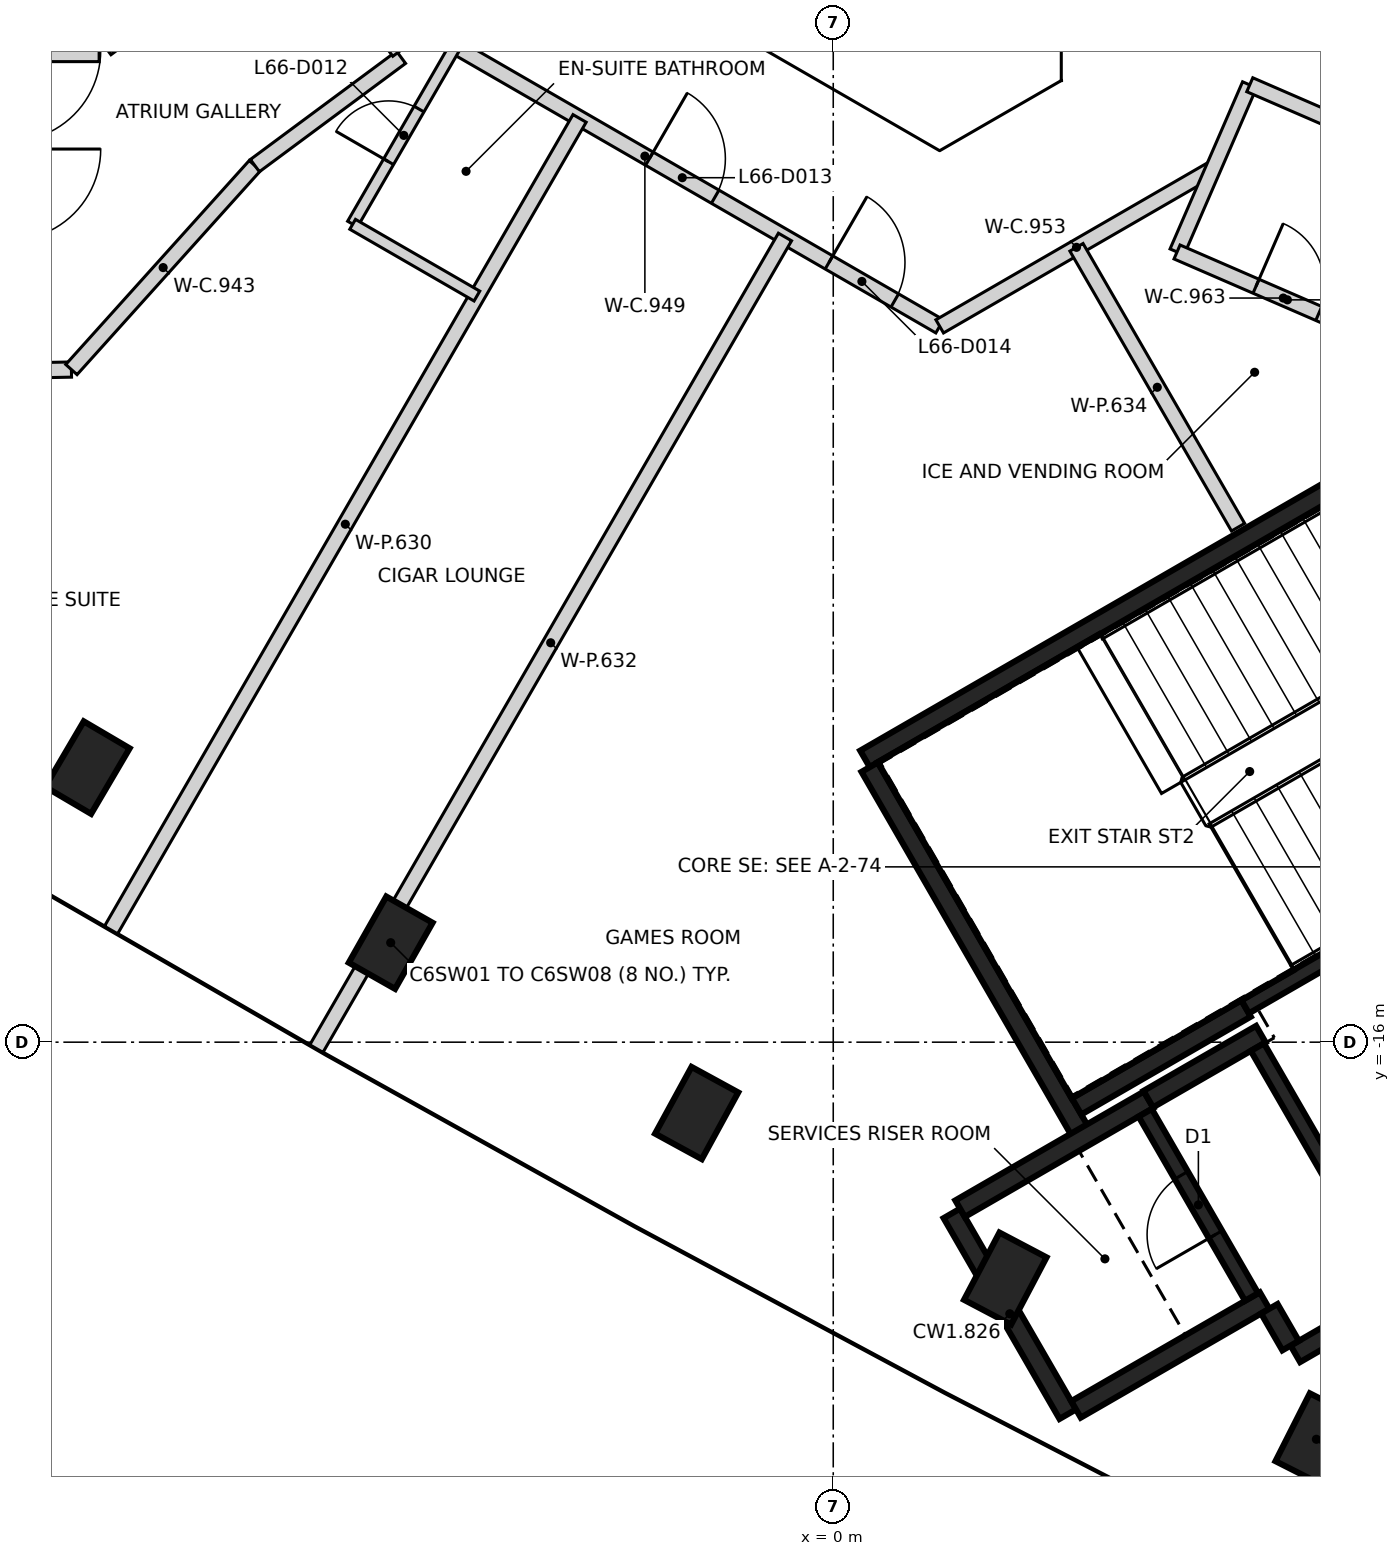
"""IFC4 building model, lengths in metres.
Left out: names, types, materials, properties, quantities, classifications, styles, units other than length and angle.
Written with IfcOpenShell. Run it as: python <this file> out.ifc"""

import sys

from ifc_helpers import new_model, si_unit, direction, frame, frame_2d, origin, origin_2d, place, context, subcontext, project, spatial, rectangle, extrude, element, fill, save


model = new_model("IFC4")
c1 = context("Model", 3, precision=1e-05, world=origin(), true_north=direction((0.0, 1.0)))
c2 = subcontext(c1, "Body", "Model", "MODEL_VIEW")
j1 = project(units=[si_unit("LENGTHUNIT", "METRE"), si_unit("PLANEANGLEUNIT", "RADIAN")], contexts=[c1])
p1 = place(None, origin())
s1 = spatial("IfcSite", under=j1, at=p1, CompositionType="ELEMENT")
p2 = place(p1, origin())
s2 = spatial("IfcBuilding", under=s1, at=p2, CompositionType="ELEMENT")
p3 = place(p2, frame((0.0, 0.0, 262.2)))
s3 = spatial("IfcBuildingStorey", under=s2, at=p3, CompositionType="ELEMENT", Elevation=262.2)
for number, where, z_axis, x_axis in (
    (1, (-9.812, -12.388, -0.35), (0.0, 0.0, 1.0), (0.507, 0.862, 0.0)),
    (2, (-5.822, -14.691, -0.35), (0.0, 0.0, 1.0), (0.493, 0.87, 0.0)),
    (3, (-1.797, -16.932, -0.35), (0.0, 0.0, 1.0), (0.479, 0.878, 0.0)),
    (4, (2.263, -19.11, -0.35), (0.0, 0.0, 1.0), (0.466, 0.885, 0.0)),
    (5, (6.356, -21.224, -0.35), (0.0, 0.0, 1.0), (0.452, 0.892, 0.0)),
):
    element("IfcColumn", number, at=place(p3, frame(where, z_axis=z_axis, x_axis=x_axis)), inside=s3, PredefinedType="COLUMN", context=c2, shape_type="SweptSolid", body=[
        extrude(rectangle(XDim=1.0, YDim=0.7, at=origin_2d()), origin(), (0.0, 0.0, 1.0), 3.6),
    ])
p4 = place(p3, frame((0.417, -12.273, 0.0), z_axis=(0.0, 0.0, 1.0), x_axis=(0.866021906294, 0.500006057782, 0.0)))
e6 = element("IfcWall", 6, at=p4, inside=s3, PredefinedType="SHEAR", context=c2, shape_type="SweptSolid", body=[
    extrude(rectangle(XDim=11.55, YDim=0.25, at=frame_2d((5.775, 0.0))), origin(), (0.0, 0.0, 1.0), 3.25),
])
p5 = place(p4, frame((10.025, 0.0, 0.0)))
e7 = element("IfcOpeningElement", 7, at=p5, cuts=e6, PredefinedType="OPENING", context=c2, shape_type="SweptSolid", body=[
    extrude(rectangle(XDim=1.2, YDim=2.1, at=frame_2d((0.6, 1.05))), frame((0.0, 0.135, 0.0), z_axis=(0.0, -1.0, 0.0), x_axis=(1.0, 0.0, 0.0)), (0.0, 0.0, 1.0), 0.27),
])
p6 = place(p4, frame((8.725, 0.0, 0.0)))
e8 = element("IfcOpeningElement", 8, at=p6, cuts=e6, PredefinedType="OPENING", context=c2, shape_type="SweptSolid", body=[
    extrude(rectangle(XDim=1.2, YDim=2.1, at=frame_2d((0.6, 1.05))), frame((0.0, 0.135, 0.0), z_axis=(0.0, -1.0, 0.0), x_axis=(1.0, 0.0, 0.0)), (0.0, 0.0, 1.0), 0.27),
])
p7 = place(p3, frame((3.235, -17.153, 0.0), z_axis=(0.0, 0.0, 1.0), x_axis=(-0.500008851346, 0.866020293397, 0.0)))
e9 = element("IfcWall", 9, at=p7, inside=s3, PredefinedType="SHEAR", context=c2, shape_type="SweptSolid", body=[
    extrude(rectangle(XDim=5.51, YDim=0.25, at=frame_2d((2.755, 0.0))), origin(), (0.0, 0.0, 1.0), 3.25),
])
p8 = place(p3, frame((3.085, -20.894, 0.0), z_axis=(0.0, 0.0, 1.0), x_axis=(-0.499978833458, 0.866037623948, 0.0)))
e10 = element("IfcWall", 10, at=p8, inside=s3, PredefinedType="SHEAR", context=c2, shape_type="SweptSolid", body=[
    extrude(rectangle(XDim=3.05, YDim=0.25, at=frame_2d((1.525, 0.0))), origin(), (0.0, 0.0, 1.0), 3.25),
])
p9 = place(p3, frame((1.669, -18.19, 0.0), z_axis=(0.0, 0.0, 1.0), x_axis=(0.866042235819, 0.499970844928, 0.0)))
e11 = element("IfcWall", 11, at=p9, inside=s3, PredefinedType="SHEAR", context=c2, shape_type="SweptSolid", body=[
    extrude(rectangle(XDim=2.865, YDim=0.25, at=frame_2d((1.432, 0.0))), origin(), (0.0, 0.0, 1.0), 3.25),
])
p10 = place(p3, frame((5.675, -19.399, 0.0), z_axis=(0.0, 0.0, 1.0), x_axis=(-0.866026637627, -0.499997862916, 0.0)))
e12 = element("IfcWall", 12, at=p10, inside=s3, PredefinedType="SHEAR", context=c2, shape_type="SweptSolid", body=[
    extrude(rectangle(XDim=2.865, YDim=0.25, at=frame_2d((1.432, 0.0))), origin(), (0.0, 0.0, 1.0), 3.25),
])
p11 = place(p3, frame((5.431, -15.556, 0.0), z_axis=(0.0, 0.0, 1.0), x_axis=(-0.866022940537, -0.500004266446, 0.0)))
e13 = element("IfcWall", 13, at=p11, inside=s3, PredefinedType="SHEAR", context=c2, shape_type="SweptSolid", body=[
    extrude(rectangle(XDim=2.575, YDim=0.25, at=frame_2d((1.287, 0.0))), origin(), (0.0, 0.0, 1.0), 3.25),
])
p12 = place(p3, frame((4.145, -16.749, 0.0), z_axis=(0.0, 0.0, 1.0), x_axis=(0.866038183914, 0.499977863513, 0.0)))
e14 = element("IfcWall", 14, at=p12, inside=s3, PredefinedType="SHEAR", context=c2, shape_type="SweptSolid", body=[
    extrude(rectangle(XDim=1.71, YDim=0.25, at=frame_2d((0.855, 0.0))), origin(), (0.0, 0.0, 1.0), 3.25),
])
p13 = place(p3, frame((7.452, -19.308, 0.0), z_axis=(0.0, 0.0, 1.0), x_axis=(-0.866044474677, -0.49996696679, 0.0)))
e15 = element("IfcWall", 15, at=p13, inside=s3, PredefinedType="SHEAR", context=c2, shape_type="SweptSolid", body=[
    extrude(rectangle(XDim=1.584, YDim=0.25, at=frame_2d((0.792, 0.0))), origin(), (0.0, 0.0, 1.0), 3.25),
])
p14 = place(p3, frame((6.017, -19.992, 0.0), z_axis=(0.0, 0.0, 1.0), x_axis=(-0.500364886717, 0.865814633822, 0.0)))
e16 = element("IfcWall", 16, at=p14, inside=s3, PredefinedType="SHEAR", context=c2, shape_type="SweptSolid", body=[
    extrude(rectangle(XDim=0.559, YDim=0.25, at=frame_2d((0.28, 0.0))), origin(), (0.0, 0.0, 1.0), 3.25),
])
p15 = place(p3, frame((5.419, -15.534, 0.0), z_axis=(0.0, 0.0, 1.0), x_axis=(0.866029065029, 0.499993658486, 0.0)))
e17 = element("IfcWall", 17, at=p15, inside=s3, PredefinedType="SHEAR", context=c2, shape_type="SweptSolid", body=[
    extrude(rectangle(XDim=5.974, YDim=0.2, at=frame_2d((2.987, 0.0))), origin(), (0.0, 0.0, 1.0), 3.25),
])
p16 = place(p3, frame((5.503, -19.352, 0.0), z_axis=(0.0, 0.0, 1.0), x_axis=(-0.499986818241, 0.866033014143, 0.0)))
e18 = element("IfcWall", 18, at=p16, inside=s3, PredefinedType="SHEAR", context=c2, shape_type="SweptSolid", body=[
    extrude(rectangle(XDim=2.798, YDim=0.2, at=frame_2d((1.399, 0.0))), origin(), (0.0, 0.0, 1.0), 3.25),
])
p17 = place(p16, frame((0.949, 0.0, 0.0)))
e19 = element("IfcOpeningElement", 19, at=p17, cuts=e18, PredefinedType="OPENING", context=c2, shape_type="SweptSolid", body=[
    extrude(rectangle(XDim=0.9, YDim=2.1, at=frame_2d((0.45, 1.05))), frame((0.0, 0.11, 0.0), z_axis=(0.0, -1.0, 0.0), x_axis=(1.0, 0.0, 0.0)), (0.0, 0.0, 1.0), 0.22),
])
p18 = place(p3, frame((6.96, -18.455, 0.0), z_axis=(0.0, 0.0, 1.0), x_axis=(-0.499926705758, 0.866067716099, 0.0)))
e20 = element("IfcWall", 20, at=p18, inside=s3, PredefinedType="SHEAR", context=c2, shape_type="SweptSolid", body=[
    extrude(rectangle(XDim=2.759, YDim=0.2, at=frame_2d((1.38, 0.0))), origin(), (0.0, 0.0, 1.0), 3.25),
])
p19 = place(p3, frame((-16.732, -7.282, 0.0), z_axis=(0.0, 0.0, 1.0), x_axis=(0.999809119854, 0.019537754635, 0.0)))
e21 = element("IfcWall", 21, at=p19, inside=s3, PredefinedType="PARTITIONING", context=c2, shape_type="SweptSolid", body=[
    extrude(rectangle(XDim=6.71, YDim=0.2, at=frame_2d((3.355, 0.0))), origin(), (0.0, 0.0, 1.0), 3.25),
])
p20 = place(p19, frame((3.619, 0.0, 0.0)))
e22 = element("IfcOpeningElement", 22, at=p20, cuts=e21, PredefinedType="OPENING", context=c2, shape_type="SweptSolid", body=[
    extrude(rectangle(XDim=0.95, YDim=2.1, at=frame_2d((0.475, 1.05))), frame((0.0, 0.11, 0.0), z_axis=(0.0, -1.0, 0.0), x_axis=(1.0, 0.0, 0.0)), (0.0, 0.0, 1.0), 0.22),
])
p21 = place(p3, frame((-10.652, -3.0, 0.0), z_axis=(0.0, 0.0, 1.0), x_axis=(1.0, 0.0, 0.0)))
e23 = element("IfcWall", 23, at=p21, inside=s3, PredefinedType="PARTITIONING", context=c2, shape_type="SweptSolid", body=[
    extrude(rectangle(XDim=0.994, YDim=0.2, at=frame_2d((0.497, 0.0))), origin(), (0.0, 0.0, 1.0), 3.25),
])
p22 = place(p3, frame((-10.023, -7.151, 0.0), z_axis=(0.0, 0.0, 1.0), x_axis=(0.668886243279, 0.743364778256, 0.0)))
e24 = element("IfcWall", 24, at=p22, inside=s3, PredefinedType="PARTITIONING", context=c2, shape_type="SweptSolid", body=[
    extrude(rectangle(XDim=3.609, YDim=0.2, at=frame_2d((1.805, 0.0))), origin(), (0.0, 0.0, 1.0), 3.25),
])
p23 = place(p3, frame((-7.115, -1.115, 0.0), z_axis=(0.0, 0.0, 1.0), x_axis=(-0.803344165632, -0.595515030495, 0.0)))
e25 = element("IfcWall", 25, at=p23, inside=s3, PredefinedType="PARTITIONING", context=c2, shape_type="SweptSolid", body=[
    extrude(rectangle(XDim=3.046, YDim=0.2, at=frame_2d((1.523, 0.0))), origin(), (0.0, 0.0, 1.0), 3.25),
])
p24 = place(p23, frame((1.133, 0.0, 0.0)))
e26 = element("IfcOpeningElement", 26, at=p24, cuts=e25, PredefinedType="OPENING", context=c2, shape_type="SweptSolid", body=[
    extrude(rectangle(XDim=0.9, YDim=2.1, at=frame_2d((0.45, 1.05))), frame((0.0, 0.11, 0.0), z_axis=(0.0, -1.0, 0.0), x_axis=(1.0, 0.0, 0.0)), (0.0, 0.0, 1.0), 0.22),
])
p25 = place(p3, frame((-7.609, -4.468, 0.0), z_axis=(0.0, 0.0, 1.0), x_axis=(0.803414413351, 0.595420255298, 0.0)))
e27 = element("IfcWall", 27, at=p25, inside=s3, PredefinedType="PARTITIONING", context=c2, shape_type="SweptSolid", body=[
    extrude(rectangle(XDim=2.393, YDim=0.2, at=frame_2d((1.197, 0.0))), origin(), (0.0, 0.0, 1.0), 3.25),
])
p26 = place(p3, frame((-6.057, -2.507, 0.0), z_axis=(0.0, 0.0, 1.0), x_axis=(0.594974339713, -0.803744695213, 0.0)))
e28 = element("IfcWall", 28, at=p26, inside=s3, PredefinedType="PARTITIONING", context=c2, shape_type="SweptSolid", body=[
    extrude(rectangle(XDim=0.576, YDim=0.2, at=frame_2d((0.288, 0.0))), origin(), (0.0, 0.0, 1.0), 3.25),
])
p27 = place(p3, frame((-6.356, -2.103, 0.0), z_axis=(0.0, 0.0, 1.0), x_axis=(0.865939059902, -0.50014952218, 0.0)))
e29 = element("IfcWall", 29, at=p27, inside=s3, PredefinedType="PARTITIONING", context=c2, shape_type="SweptSolid", body=[
    extrude(rectangle(XDim=8.956, YDim=0.2, at=frame_2d((4.478, 0.0))), origin(), (0.0, 0.0, 1.0), 3.25),
])
p28 = place(p27, frame((4.546, 0.0, 0.0)))
e30 = element("IfcOpeningElement", 30, at=p28, cuts=e29, PredefinedType="OPENING", context=c2, shape_type="SweptSolid", body=[
    extrude(rectangle(XDim=1.0, YDim=2.1, at=frame_2d((0.5, 1.05))), frame((0.0, 0.11, 0.0), z_axis=(0.0, -1.0, 0.0), x_axis=(1.0, 0.0, 0.0)), (0.0, 0.0, 1.0), 0.22),
])
p29 = place(p27, frame((7.275, 0.0, 0.0)))
e31 = element("IfcOpeningElement", 31, at=p29, cuts=e29, PredefinedType="OPENING", context=c2, shape_type="SweptSolid", body=[
    extrude(rectangle(XDim=1.0, YDim=2.1, at=frame_2d((0.5, 1.05))), frame((0.0, 0.11, 0.0), z_axis=(0.0, -1.0, 0.0), x_axis=(1.0, 0.0, 0.0)), (0.0, 0.0, 1.0), 0.22),
])
p30 = place(p3, frame((1.401, -6.583, 0.0), z_axis=(0.0, 0.0, 1.0), x_axis=(0.865818713766, 0.500357826853, 0.0)))
e32 = element("IfcWall", 32, at=p30, inside=s3, PredefinedType="PARTITIONING", context=c2, shape_type="SweptSolid", body=[
    extrude(rectangle(XDim=4.157, YDim=0.2, at=frame_2d((2.079, 0.0))), origin(), (0.0, 0.0, 1.0), 3.25),
])
p31 = place(p3, frame((4.523, -5.604, 0.0), z_axis=(0.0, 0.0, 1.0), x_axis=(0.398033282066, 0.917370975324, 0.0)))
e33 = element("IfcWall", 33, at=p31, inside=s3, PredefinedType="PARTITIONING", context=c2, shape_type="SweptSolid", body=[
    extrude(rectangle(XDim=2.397, YDim=0.2, at=frame_2d((1.198, 0.0))), origin(), (0.0, 0.0, 1.0), 3.25),
])
p32 = place(p3, frame((4.523, -5.604, 0.0), z_axis=(0.0, 0.0, 1.0), x_axis=(0.917390838441, -0.397987499231, 0.0)))
e34 = element("IfcWall", 34, at=p32, inside=s3, PredefinedType="PARTITIONING", context=c2, shape_type="SweptSolid", body=[
    extrude(rectangle(XDim=3.046, YDim=0.2, at=frame_2d((1.523, 0.0))), origin(), (0.0, 0.0, 1.0), 3.25),
])
p33 = place(p32, frame((1.133, 0.0, 0.0)))
e35 = element("IfcOpeningElement", 35, at=p33, cuts=e34, PredefinedType="OPENING", context=c2, shape_type="SweptSolid", body=[
    extrude(rectangle(XDim=0.9, YDim=2.1, at=frame_2d((0.45, 1.05))), frame((0.0, 0.11, 0.0), z_axis=(0.0, -1.0, 0.0), x_axis=(1.0, 0.0, 0.0)), (0.0, 0.0, 1.0), 0.22),
])
p34 = place(p3, frame((5.48, -3.404, 0.0), z_axis=(0.0, 0.0, 1.0), x_axis=(0.917402729571, -0.39796008817, 0.0)))
e36 = element("IfcWall", 36, at=p34, inside=s3, PredefinedType="PARTITIONING", context=c2, shape_type="SweptSolid", body=[
    extrude(rectangle(XDim=2.389, YDim=0.2, at=frame_2d((1.195, 0.0))), origin(), (0.0, 0.0, 1.0), 3.25),
])
p35 = place(p3, frame((-9.501, -14.524, 0.0), z_axis=(0.0, 0.0, 1.0), x_axis=(0.499964147476, 0.86604610226, 0.0)))
e37 = element("IfcWall", 37, at=p35, inside=s3, PredefinedType="PARTITIONING", context=c2, shape_type="SweptSolid", body=[
    extrude(rectangle(XDim=12.329, YDim=0.2, at=frame_2d((6.165, 0.0))), origin(), (0.0, 0.0, 1.0), 2.35),
])
p36 = place(p3, frame((-6.8, -16.084, 0.0), z_axis=(0.0, 0.0, 1.0), x_axis=(0.500002425662, 0.866024003323, 0.0)))
e38 = element("IfcWall", 38, at=p36, inside=s3, PredefinedType="PARTITIONING", context=c2, shape_type="SweptSolid", body=[
    extrude(rectangle(XDim=12.329, YDim=0.2, at=frame_2d((6.165, 0.0))), origin(), (0.0, 0.0, 1.0), 3.25),
])
p37 = place(p3, frame((3.2, -5.543, 0.0), z_axis=(0.0, 0.0, 1.0), x_axis=(0.500060428066, -0.865990512813, 0.0)))
e39 = element("IfcWall", 39, at=p37, inside=s3, PredefinedType="PARTITIONING", context=c2, shape_type="SweptSolid", body=[
    extrude(rectangle(XDim=4.252, YDim=0.2, at=frame_2d((2.126, 0.0))), origin(), (0.0, 0.0, 1.0), 3.25),
])
p38 = place(p3, frame((-6.324, -5.237, 0.0), z_axis=(0.0, 0.0, 1.0), x_axis=(0.500294180644, 0.865855491877, 0.0)))
e40 = element("IfcWall", 40, at=p38, inside=s3, PredefinedType="PARTITIONING", context=c2, shape_type="SweptSolid", body=[
    extrude(rectangle(XDim=2.698, YDim=0.15, at=frame_2d((1.349, 0.0))), origin(), (0.0, 0.0, 1.0), 3.25),
])
p39 = place(p38, frame((0.948, 0.0, 0.0)))
e41 = element("IfcOpeningElement", 41, at=p39, cuts=e40, PredefinedType="OPENING", context=c2, shape_type="SweptSolid", body=[
    extrude(rectangle(XDim=0.8, YDim=2.1, at=frame_2d((0.4, 1.05))), frame((0.0, 0.085, 0.0), z_axis=(0.0, -1.0, 0.0), x_axis=(1.0, 0.0, 0.0)), (0.0, 0.0, 1.0), 0.17),
])
p40 = place(p3, frame((-6.323, -5.24, 0.0), z_axis=(0.0, 0.0, 1.0), x_axis=(0.865998231832, -0.50004706025, 0.0)))
e42 = element("IfcWall", 42, at=p40, inside=s3, PredefinedType="PARTITIONING", context=c2, shape_type="SweptSolid", body=[
    extrude(rectangle(XDim=1.888, YDim=0.15, at=frame_2d((0.944, 0.0))), origin(), (0.0, 0.0, 1.0), 3.25),
])
p41 = place(p17, origin())
e43 = element("IfcDoor", 43, at=p41, inside=s3, OperationType="SINGLE_SWING_LEFT", PredefinedType="DOOR", context=c2, shape_type="SweptSolid", body=[
    extrude(rectangle(XDim=0.9, YDim=2.1, at=frame_2d((0.45, 1.05))), frame((0.0, 0.025, 0.0), z_axis=(0.0, -1.0, 0.0), x_axis=(1.0, 0.0, 0.0)), (0.0, 0.0, 1.0), 0.05),
])
fill(e19, e43)
p42 = place(p33, frame((0.9, 0.0, 0.0), z_axis=(0.0, 0.0, 1.0), x_axis=(-1.0, 0.0, 0.0)))
e44 = element("IfcDoor", 44, at=p42, inside=s3, OperationType="SINGLE_SWING_LEFT", PredefinedType="DOOR", context=c2, shape_type="SweptSolid", body=[
    extrude(rectangle(XDim=0.9, YDim=2.1, at=frame_2d((0.45, 1.05))), frame((0.0, 0.025, 0.0), z_axis=(0.0, -1.0, 0.0), x_axis=(1.0, 0.0, 0.0)), (0.0, 0.0, 1.0), 0.05),
])
fill(e35, e44)
p43 = place(p39, origin())
e45 = element("IfcDoor", 45, at=p43, inside=s3, OperationType="SINGLE_SWING_LEFT", PredefinedType="DOOR", context=c2, shape_type="SweptSolid", body=[
    extrude(rectangle(XDim=0.8, YDim=2.1, at=frame_2d((0.4, 1.05))), frame((0.0, 0.025, 0.0), z_axis=(0.0, -1.0, 0.0), x_axis=(1.0, 0.0, 0.0)), (0.0, 0.0, 1.0), 0.05),
])
fill(e41, e45)
p44 = place(p28, frame((1.0, 0.0, 0.0), z_axis=(0.0, 0.0, 1.0), x_axis=(-1.0, 0.0, 0.0)))
e46 = element("IfcDoor", 46, at=p44, inside=s3, OperationType="SINGLE_SWING_LEFT", PredefinedType="DOOR", context=c2, shape_type="SweptSolid", body=[
    extrude(rectangle(XDim=1.0, YDim=2.1, at=frame_2d((0.5, 1.05))), frame((0.0, 0.025, 0.0), z_axis=(0.0, -1.0, 0.0), x_axis=(1.0, 0.0, 0.0)), (0.0, 0.0, 1.0), 0.05),
])
fill(e30, e46)
p45 = place(p29, frame((1.0, 0.0, 0.0), z_axis=(0.0, 0.0, 1.0), x_axis=(-1.0, 0.0, 0.0)))
e47 = element("IfcDoor", 47, at=p45, inside=s3, OperationType="SINGLE_SWING_LEFT", PredefinedType="DOOR", context=c2, shape_type="SweptSolid", body=[
    extrude(rectangle(XDim=1.0, YDim=2.1, at=frame_2d((0.5, 1.05))), frame((0.0, 0.025, 0.0), z_axis=(0.0, -1.0, 0.0), x_axis=(1.0, 0.0, 0.0)), (0.0, 0.0, 1.0), 0.05),
])
fill(e31, e47)
save(model, sys.argv[1])
